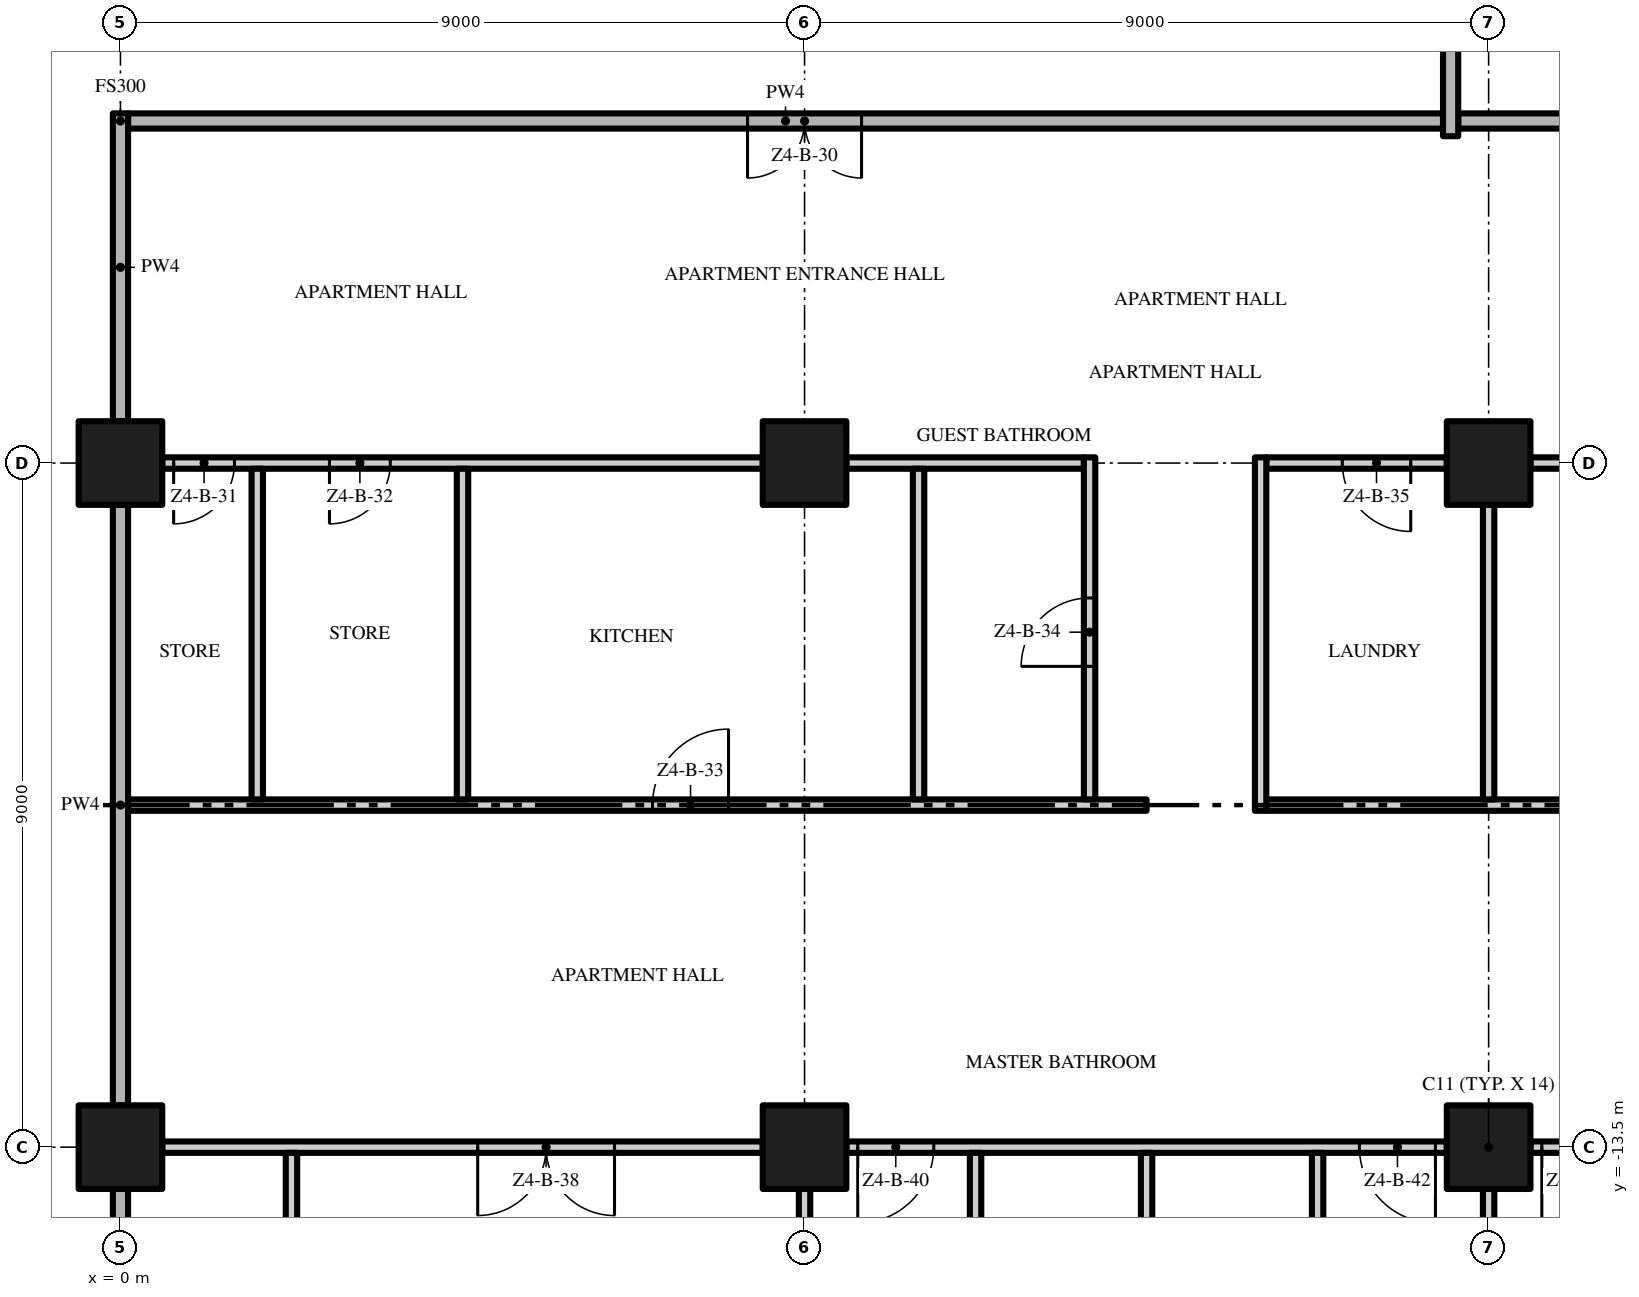
"""IFC4 building model, lengths in metres.
Left out: names, types, materials, properties, quantities, classifications, styles, units other than length and angle.
Written with IfcOpenShell. Run it as: python <this file> out.ifc"""

import sys

from ifc_helpers import new_model, si_unit, direction, frame, frame_2d, origin, origin_2d, place, context, subcontext, project, spatial, rectangle, extrude, element, fill, save


model = new_model("IFC4")
c1 = context("Model", 3, precision=1e-05, world=origin(), true_north=direction((0.0, 1.0)))
c2 = subcontext(c1, "Body", "Model", "MODEL_VIEW")
j1 = project(units=[si_unit("LENGTHUNIT", "METRE"), si_unit("PLANEANGLEUNIT", "RADIAN")], contexts=[c1])
p1 = place(None, origin())
s1 = spatial("IfcSite", under=j1, at=p1, CompositionType="ELEMENT")
p2 = place(p1, origin())
s2 = spatial("IfcBuilding", under=s1, at=p2, CompositionType="ELEMENT")
p3 = place(p2, frame((0.0, 0.0, 199.6)))
s3 = spatial("IfcBuildingStorey", under=s2, at=p3, CompositionType="ELEMENT", Elevation=199.6)
for number, where, z_axis, x_axis in (
    (1, (0.0, -13.5, 0.0), (0.0, 0.0, 1.0), (1.0, 0.0, 0.0)),
    (2, (0.0, -4.5, 0.0), (0.0, 0.0, 1.0), (1.0, 0.0, 0.0)),
    (3, (18.0, -13.5, 0.0), (0.0, 0.0, 1.0), (1.0, 0.0, 0.0)),
    (4, (18.0, -4.5, 0.0), (0.0, 0.0, 1.0), (1.0, 0.0, 0.0)),
    (5, (9.0, -13.5, 0.0), (0.0, 0.0, 1.0), (1.0, 0.0, 0.0)),
    (6, (9.0, -4.5, 0.0), (0.0, 0.0, 1.0), (1.0, 0.0, 0.0)),
):
    element("IfcColumn", number, at=place(p3, frame(where, z_axis=z_axis, x_axis=x_axis)), inside=s3, PredefinedType="COLUMN", context=c2, shape_type="SweptSolid", body=[
        extrude(rectangle(XDim=1.1, YDim=1.1, at=origin_2d()), origin(), (0.0, 0.0, 1.0), 3.5),
    ])
p4 = place(p3, frame((8.45, -13.5, 0.0), z_axis=(0.0, 0.0, 1.0), x_axis=(-1.0, 0.0, 0.0)))
e7 = element("IfcWall", 7, at=p4, inside=s3, PredefinedType="PARTITIONING", context=c2, shape_type="SweptSolid", body=[
    extrude(rectangle(XDim=7.9, YDim=0.15, at=frame_2d((3.95, 0.0))), origin(), (0.0, 0.0, 1.0), 3.5),
])
p5 = place(p4, frame((1.95, 0.0, 0.0)))
e8 = element("IfcOpeningElement", 8, at=p5, cuts=e7, PredefinedType="OPENING", context=c2, shape_type="SweptSolid", body=[
    extrude(rectangle(XDim=1.8, YDim=2.4, at=frame_2d((0.9, 1.2))), frame((0.0, 0.085, 0.0), z_axis=(0.0, -1.0, 0.0), x_axis=(1.0, 0.0, 0.0)), (0.0, 0.0, 1.0), 0.17),
])
p6 = place(p3, frame((17.45, -13.5, 0.0), z_axis=(0.0, 0.0, 1.0), x_axis=(-1.0, 0.0, 0.0)))
e9 = element("IfcWall", 9, at=p6, inside=s3, PredefinedType="PARTITIONING", context=c2, shape_type="SweptSolid", body=[
    extrude(rectangle(XDim=7.9, YDim=0.15, at=frame_2d((3.95, 0.0))), origin(), (0.0, 0.0, 1.0), 3.5),
])
p7 = place(p6, frame((6.75, 0.0, 0.0)))
e10 = element("IfcOpeningElement", 10, at=p7, cuts=e9, PredefinedType="OPENING", context=c2, shape_type="SweptSolid", body=[
    extrude(rectangle(XDim=1.0, YDim=2.4, at=frame_2d((0.5, 1.2))), frame((0.0, 0.085, 0.0), z_axis=(0.0, -1.0, 0.0), x_axis=(1.0, 0.0, 0.0)), (0.0, 0.0, 1.0), 0.17),
])
p8 = place(p6, frame((0.15, 0.0, 0.0)))
e11 = element("IfcOpeningElement", 11, at=p8, cuts=e9, PredefinedType="OPENING", context=c2, shape_type="SweptSolid", body=[
    extrude(rectangle(XDim=1.0, YDim=2.4, at=frame_2d((0.5, 1.2))), frame((0.0, 0.085, 0.0), z_axis=(0.0, -1.0, 0.0), x_axis=(1.0, 0.0, 0.0)), (0.0, 0.0, 1.0), 0.17),
])
p9 = place(p3, frame((26.0, -13.5, 0.0), z_axis=(0.0, 0.0, 1.0), x_axis=(-1.0, 0.0, 0.0)))
e12 = element("IfcWall", 12, at=p9, inside=s3, PredefinedType="PARTITIONING", context=c2, shape_type="SweptSolid", body=[
    extrude(rectangle(XDim=7.45, YDim=0.15, at=frame_2d((3.725, 0.0))), origin(), (0.0, 0.0, 1.0), 3.5),
])
p10 = place(p9, frame((6.3, 0.0, 0.0)))
e13 = element("IfcOpeningElement", 13, at=p10, cuts=e12, PredefinedType="OPENING", context=c2, shape_type="SweptSolid", body=[
    extrude(rectangle(XDim=1.0, YDim=2.4, at=frame_2d((0.5, 1.2))), frame((0.0, 0.085, 0.0), z_axis=(0.0, -1.0, 0.0), x_axis=(1.0, 0.0, 0.0)), (0.0, 0.0, 1.0), 0.17),
])
p11 = place(p9, frame((0.75, 0.0, 0.0)))
e14 = element("IfcOpeningElement", 14, at=p11, cuts=e12, PredefinedType="OPENING", context=c2, shape_type="SweptSolid", body=[
    extrude(rectangle(XDim=1.0, YDim=2.4, at=frame_2d((0.5, 1.2))), frame((0.0, 0.085, 0.0), z_axis=(0.0, -1.0, 0.0), x_axis=(1.0, 0.0, 0.0)), (0.0, 0.0, 1.0), 0.17),
])
p12 = place(p3, frame((0.1, -9.0, 0.0), z_axis=(0.0, 0.0, 1.0), x_axis=(1.0, 0.0, 0.0)))
e15 = element("IfcWall", 15, at=p12, inside=s3, PredefinedType="PARTITIONING", context=c2, shape_type="SweptSolid", body=[
    extrude(rectangle(XDim=13.4, YDim=0.15, at=frame_2d((6.7, 0.0))), origin(), (0.0, 0.0, 1.0), 3.5),
])
p13 = place(p12, frame((6.9, 0.0, 0.0)))
e16 = element("IfcOpeningElement", 16, at=p13, cuts=e15, PredefinedType="OPENING", context=c2, shape_type="SweptSolid", body=[
    extrude(rectangle(XDim=1.0, YDim=2.4, at=frame_2d((0.5, 1.2))), frame((0.0, 0.085, 0.0), z_axis=(0.0, -1.0, 0.0), x_axis=(1.0, 0.0, 0.0)), (0.0, 0.0, 1.0), 0.17),
])
p14 = place(p3, frame((15.075, -9.0, 0.0), z_axis=(0.0, 0.0, 1.0), x_axis=(1.0, 0.0, 0.0)))
e17 = element("IfcWall", 17, at=p14, inside=s3, PredefinedType="PARTITIONING", context=c2, shape_type="SweptSolid", body=[
    extrude(rectangle(XDim=11.625, YDim=0.15, at=frame_2d((5.812, 0.0))), origin(), (0.0, 0.0, 1.0), 3.5),
])
p15 = place(p3, frame((8.45, -4.5, 0.0), z_axis=(0.0, 0.0, 1.0), x_axis=(-1.0, 0.0, 0.0)))
e18 = element("IfcWall", 18, at=p15, inside=s3, PredefinedType="PARTITIONING", context=c2, shape_type="SweptSolid", body=[
    extrude(rectangle(XDim=7.9, YDim=0.15, at=frame_2d((3.95, 0.0))), origin(), (0.0, 0.0, 1.0), 3.5),
])
p16 = place(p15, frame((6.95, 0.0, 0.0)))
e19 = element("IfcOpeningElement", 19, at=p16, cuts=e18, PredefinedType="OPENING", context=c2, shape_type="SweptSolid", body=[
    extrude(rectangle(XDim=0.8, YDim=2.0, at=frame_2d((0.4, 1.0))), frame((0.0, 0.085, 0.0), z_axis=(0.0, -1.0, 0.0), x_axis=(1.0, 0.0, 0.0)), (0.0, 0.0, 1.0), 0.17),
])
p17 = place(p15, frame((4.9, 0.0, 0.0)))
e20 = element("IfcOpeningElement", 20, at=p17, cuts=e18, PredefinedType="OPENING", context=c2, shape_type="SweptSolid", body=[
    extrude(rectangle(XDim=0.8, YDim=2.0, at=frame_2d((0.4, 1.0))), frame((0.0, 0.085, 0.0), z_axis=(0.0, -1.0, 0.0), x_axis=(1.0, 0.0, 0.0)), (0.0, 0.0, 1.0), 0.17),
])
p18 = place(p3, frame((9.55, -4.5, 0.0), z_axis=(0.0, 0.0, 1.0), x_axis=(1.0, 0.0, 0.0)))
e21 = element("IfcWall", 21, at=p18, inside=s3, PredefinedType="PARTITIONING", context=c2, shape_type="SweptSolid", body=[
    extrude(rectangle(XDim=3.125, YDim=0.15, at=frame_2d((1.562, 0.0))), origin(), (0.0, 0.0, 1.0), 3.5),
])
p19 = place(p3, frame((17.45, -4.5, 0.0), z_axis=(0.0, 0.0, 1.0), x_axis=(-1.0, 0.0, 0.0)))
e22 = element("IfcWall", 22, at=p19, inside=s3, PredefinedType="PARTITIONING", context=c2, shape_type="SweptSolid", body=[
    extrude(rectangle(XDim=2.375, YDim=0.15, at=frame_2d((1.188, 0.0))), origin(), (0.0, 0.0, 1.0), 3.5),
])
p20 = place(p19, frame((0.475, 0.0, 0.0)))
e23 = element("IfcOpeningElement", 23, at=p20, cuts=e22, PredefinedType="OPENING", context=c2, shape_type="SweptSolid", body=[
    extrude(rectangle(XDim=0.9, YDim=2.1, at=frame_2d((0.45, 1.05))), frame((0.0, 0.085, 0.0), z_axis=(0.0, -1.0, 0.0), x_axis=(1.0, 0.0, 0.0)), (0.0, 0.0, 1.0), 0.17),
])
p21 = place(p3, frame((26.0, -4.5, 0.0), z_axis=(0.0, 0.0, 1.0), x_axis=(-1.0, 0.0, 0.0)))
e24 = element("IfcWall", 24, at=p21, inside=s3, PredefinedType="PARTITIONING", context=c2, shape_type="SweptSolid", body=[
    extrude(rectangle(XDim=7.45, YDim=0.15, at=frame_2d((3.725, 0.0))), origin(), (0.0, 0.0, 1.0), 3.5),
])
p22 = place(p21, frame((4.95, 0.0, 0.0)))
e25 = element("IfcOpeningElement", 25, at=p22, cuts=e24, PredefinedType="OPENING", context=c2, shape_type="SweptSolid", body=[
    extrude(rectangle(XDim=0.9, YDim=2.1, at=frame_2d((0.45, 1.05))), frame((0.0, 0.085, 0.0), z_axis=(0.0, -1.0, 0.0), x_axis=(1.0, 0.0, 0.0)), (0.0, 0.0, 1.0), 0.17),
])
p23 = place(p3, frame((17.4, 0.0, 0.0), z_axis=(0.0, 0.0, 1.0), x_axis=(-1.0, 0.0, 0.0)))
e26 = element("IfcWall", 26, at=p23, inside=s3, PredefinedType="PARTITIONING", context=c2, shape_type="SweptSolid", body=[
    extrude(rectangle(XDim=17.3, YDim=0.2, at=frame_2d((8.65, 0.0))), origin(), (0.0, 0.0, 1.0), 3.5),
])
p24 = place(p23, frame((7.65, 0.0, 0.0)))
e27 = element("IfcOpeningElement", 27, at=p24, cuts=e26, PredefinedType="OPENING", context=c2, shape_type="SweptSolid", body=[
    extrude(rectangle(XDim=1.5, YDim=2.4, at=frame_2d((0.75, 1.2))), frame((0.0, 0.11, 0.0), z_axis=(0.0, -1.0, 0.0), x_axis=(1.0, 0.0, 0.0)), (0.0, 0.0, 1.0), 0.22),
])
p25 = place(p3, frame((17.6, 0.0, 0.0), z_axis=(0.0, 0.0, 1.0), x_axis=(1.0, 0.0, 0.0)))
e28 = element("IfcWall", 28, at=p25, inside=s3, PredefinedType="PARTITIONING", context=c2, shape_type="SweptSolid", body=[
    extrude(rectangle(XDim=9.1, YDim=0.2, at=frame_2d((4.55, 0.0))), origin(), (0.0, 0.0, 1.0), 3.5),
])
p26 = place(p3, frame((0.0, -21.5, 0.0), z_axis=(0.0, 0.0, 1.0), x_axis=(0.0, 1.0, 0.0)))
e29 = element("IfcWall", 29, at=p26, inside=s3, PredefinedType="PARTITIONING", context=c2, shape_type="SweptSolid", body=[
    extrude(rectangle(XDim=7.45, YDim=0.2, at=frame_2d((3.725, 0.0))), origin(), (0.0, 0.0, 1.0), 3.5),
])
p27 = place(p3, frame((0.0, -12.95, 0.0), z_axis=(0.0, 0.0, 1.0), x_axis=(0.0, 1.0, 0.0)))
e30 = element("IfcWall", 30, at=p27, inside=s3, PredefinedType="PARTITIONING", context=c2, shape_type="SweptSolid", body=[
    extrude(rectangle(XDim=7.9, YDim=0.2, at=frame_2d((3.95, 0.0))), origin(), (0.0, 0.0, 1.0), 3.5),
])
p28 = place(p3, frame((0.0, -3.95, 0.0), z_axis=(0.0, 0.0, 1.0), x_axis=(0.0, 1.0, 0.0)))
e31 = element("IfcWall", 31, at=p28, inside=s3, PredefinedType="PARTITIONING", context=c2, shape_type="SweptSolid", body=[
    extrude(rectangle(XDim=4.05, YDim=0.2, at=frame_2d((2.025, 0.0))), origin(), (0.0, 0.0, 1.0), 3.5),
])
p29 = place(p3, frame((1.8, -8.925, 0.0), z_axis=(0.0, 0.0, 1.0), x_axis=(0.0, 1.0, 0.0)))
e32 = element("IfcWall", 32, at=p29, inside=s3, PredefinedType="PARTITIONING", context=c2, shape_type="SweptSolid", body=[
    extrude(rectangle(XDim=4.35, YDim=0.15, at=frame_2d((2.175, 0.0))), origin(), (0.0, 0.0, 1.0), 3.5),
])
p30 = place(p3, frame((2.25, -16.575, 0.0), z_axis=(0.0, 0.0, 1.0), x_axis=(0.0, 1.0, 0.0)))
e33 = element("IfcWall", 33, at=p30, inside=s3, PredefinedType="PARTITIONING", context=c2, shape_type="SweptSolid", body=[
    extrude(rectangle(XDim=3.0, YDim=0.15, at=frame_2d((1.5, 0.0))), origin(), (0.0, 0.0, 1.0), 3.5),
])
p31 = place(p30, frame((1.125, 0.0, 0.0)))
e34 = element("IfcOpeningElement", 34, at=p31, cuts=e33, PredefinedType="OPENING", context=c2, shape_type="SweptSolid", body=[
    extrude(rectangle(XDim=0.9, YDim=2.1, at=frame_2d((0.45, 1.05))), frame((0.0, 0.085, 0.0), z_axis=(0.0, -1.0, 0.0), x_axis=(1.0, 0.0, 0.0)), (0.0, 0.0, 1.0), 0.17),
])
p32 = place(p3, frame((4.5, -8.925, 0.0), z_axis=(0.0, 0.0, 1.0), x_axis=(0.0, 1.0, 0.0)))
e35 = element("IfcWall", 35, at=p32, inside=s3, PredefinedType="PARTITIONING", context=c2, shape_type="SweptSolid", body=[
    extrude(rectangle(XDim=4.35, YDim=0.15, at=frame_2d((2.175, 0.0))), origin(), (0.0, 0.0, 1.0), 3.5),
])
p33 = place(p3, frame((9.0, -21.5, 0.0), z_axis=(0.0, 0.0, 1.0), x_axis=(0.0, 1.0, 0.0)))
e36 = element("IfcWall", 36, at=p33, inside=s3, PredefinedType="PARTITIONING", context=c2, shape_type="SweptSolid", body=[
    extrude(rectangle(XDim=7.45, YDim=0.15, at=frame_2d((3.725, 0.0))), origin(), (0.0, 0.0, 1.0), 3.5),
])
p34 = place(p3, frame((10.5, -8.925, 0.0), z_axis=(0.0, 0.0, 1.0), x_axis=(0.0, 1.0, 0.0)))
e37 = element("IfcWall", 37, at=p34, inside=s3, PredefinedType="PARTITIONING", context=c2, shape_type="SweptSolid", body=[
    extrude(rectangle(XDim=4.35, YDim=0.15, at=frame_2d((2.175, 0.0))), origin(), (0.0, 0.0, 1.0), 3.5),
])
p35 = place(p3, frame((11.25, -16.575, 0.0), z_axis=(0.0, 0.0, 1.0), x_axis=(0.0, 1.0, 0.0)))
e38 = element("IfcWall", 38, at=p35, inside=s3, PredefinedType="PARTITIONING", context=c2, shape_type="SweptSolid", body=[
    extrude(rectangle(XDim=3.0, YDim=0.15, at=frame_2d((1.5, 0.0))), origin(), (0.0, 0.0, 1.0), 3.5),
])
p36 = place(p3, frame((12.75, -8.925, 0.0), z_axis=(0.0, 0.0, 1.0), x_axis=(0.0, 1.0, 0.0)))
e39 = element("IfcWall", 39, at=p36, inside=s3, PredefinedType="PARTITIONING", context=c2, shape_type="SweptSolid", body=[
    extrude(rectangle(XDim=4.5, YDim=0.15, at=frame_2d((2.25, 0.0))), origin(), (0.0, 0.0, 1.0), 3.5),
])
p37 = place(p36, frame((1.75, 0.0, 0.0)))
e40 = element("IfcOpeningElement", 40, at=p37, cuts=e39, PredefinedType="OPENING", context=c2, shape_type="SweptSolid", body=[
    extrude(rectangle(XDim=0.9, YDim=2.1, at=frame_2d((0.45, 1.05))), frame((0.0, 0.085, 0.0), z_axis=(0.0, -1.0, 0.0), x_axis=(1.0, 0.0, 0.0)), (0.0, 0.0, 1.0), 0.17),
])
p38 = place(p3, frame((13.5, -22.2, 0.0), z_axis=(0.0, 0.0, 1.0), x_axis=(0.0, 1.0, 0.0)))
e41 = element("IfcWall", 41, at=p38, inside=s3, PredefinedType="PARTITIONING", context=c2, shape_type="SweptSolid", body=[
    extrude(rectangle(XDim=8.625, YDim=0.15, at=frame_2d((4.312, 0.0))), origin(), (0.0, 0.0, 1.0), 3.5),
])
p39 = place(p3, frame((15.0, -9.075, 0.0), z_axis=(0.0, 0.0, 1.0), x_axis=(0.0, 1.0, 0.0)))
e42 = element("IfcWall", 42, at=p39, inside=s3, PredefinedType="PARTITIONING", context=c2, shape_type="SweptSolid", body=[
    extrude(rectangle(XDim=4.65, YDim=0.15, at=frame_2d((2.325, 0.0))), origin(), (0.0, 0.0, 1.0), 3.5),
])
p40 = place(p3, frame((15.75, -16.575, 0.0), z_axis=(0.0, 0.0, 1.0), x_axis=(0.0, 1.0, 0.0)))
e43 = element("IfcWall", 43, at=p40, inside=s3, PredefinedType="PARTITIONING", context=c2, shape_type="SweptSolid", body=[
    extrude(rectangle(XDim=3.0, YDim=0.15, at=frame_2d((1.5, 0.0))), origin(), (0.0, 0.0, 1.0), 3.5),
])
p41 = place(p3, frame((17.5, -0.2, 0.0), z_axis=(0.0, 0.0, 1.0), x_axis=(0.0, 1.0, 0.0)))
e44 = element("IfcWall", 44, at=p41, inside=s3, PredefinedType="PARTITIONING", context=c2, shape_type="SweptSolid", body=[
    extrude(rectangle(XDim=4.15, YDim=0.2, at=frame_2d((2.075, 0.0))), origin(), (0.0, 0.0, 1.0), 3.5),
])
p42 = place(p3, frame((18.0, -21.5, 0.0), z_axis=(0.0, 0.0, 1.0), x_axis=(0.0, 1.0, 0.0)))
e45 = element("IfcWall", 45, at=p42, inside=s3, PredefinedType="PARTITIONING", context=c2, shape_type="SweptSolid", body=[
    extrude(rectangle(XDim=7.45, YDim=0.15, at=frame_2d((3.725, 0.0))), origin(), (0.0, 0.0, 1.0), 3.5),
])
p43 = place(p3, frame((18.0, -8.925, 0.0), z_axis=(0.0, 0.0, 1.0), x_axis=(0.0, 1.0, 0.0)))
e46 = element("IfcWall", 46, at=p43, inside=s3, PredefinedType="PARTITIONING", context=c2, shape_type="SweptSolid", body=[
    extrude(rectangle(XDim=3.875, YDim=0.15, at=frame_2d((1.938, 0.0))), origin(), (0.0, 0.0, 1.0), 3.5),
])
p44 = place(p24, origin())
e47 = element("IfcDoor", 47, at=p44, inside=s3, OperationType="DOUBLE_DOOR_SINGLE_SWING", PredefinedType="DOOR", context=c2, shape_type="SweptSolid", body=[
    extrude(rectangle(XDim=1.5, YDim=2.4, at=frame_2d((0.75, 1.2))), frame((0.0, 0.025, 0.0), z_axis=(0.0, -1.0, 0.0), x_axis=(1.0, 0.0, 0.0)), (0.0, 0.0, 1.0), 0.05),
])
fill(e27, e47)
p45 = place(p16, origin())
e48 = element("IfcDoor", 48, at=p45, inside=s3, OperationType="SINGLE_SWING_RIGHT", PredefinedType="DOOR", context=c2, shape_type="SweptSolid", body=[
    extrude(rectangle(XDim=0.8, YDim=2.0, at=frame_2d((0.4, 1.0))), frame((0.0, 0.025, 0.0), z_axis=(0.0, -1.0, 0.0), x_axis=(1.0, 0.0, 0.0)), (0.0, 0.0, 1.0), 0.05),
])
fill(e19, e48)
p46 = place(p17, origin())
e49 = element("IfcDoor", 49, at=p46, inside=s3, OperationType="SINGLE_SWING_RIGHT", PredefinedType="DOOR", context=c2, shape_type="SweptSolid", body=[
    extrude(rectangle(XDim=0.8, YDim=2.0, at=frame_2d((0.4, 1.0))), frame((0.0, 0.025, 0.0), z_axis=(0.0, -1.0, 0.0), x_axis=(1.0, 0.0, 0.0)), (0.0, 0.0, 1.0), 0.05),
])
fill(e20, e49)
p47 = place(p13, origin())
e50 = element("IfcDoor", 50, at=p47, inside=s3, OperationType="SINGLE_SWING_RIGHT", PredefinedType="DOOR", context=c2, shape_type="SweptSolid", body=[
    extrude(rectangle(XDim=1.0, YDim=2.4, at=frame_2d((0.5, 1.2))), frame((0.0, 0.025, 0.0), z_axis=(0.0, -1.0, 0.0), x_axis=(1.0, 0.0, 0.0)), (0.0, 0.0, 1.0), 0.05),
])
fill(e16, e50)
p48 = place(p37, origin())
e51 = element("IfcDoor", 51, at=p48, inside=s3, OperationType="SINGLE_SWING_LEFT", PredefinedType="DOOR", context=c2, shape_type="SweptSolid", body=[
    extrude(rectangle(XDim=0.9, YDim=2.1, at=frame_2d((0.45, 1.05))), frame((0.0, 0.025, 0.0), z_axis=(0.0, -1.0, 0.0), x_axis=(1.0, 0.0, 0.0)), (0.0, 0.0, 1.0), 0.05),
])
fill(e40, e51)
p49 = place(p20, origin())
e52 = element("IfcDoor", 52, at=p49, inside=s3, OperationType="SINGLE_SWING_LEFT", PredefinedType="DOOR", context=c2, shape_type="SweptSolid", body=[
    extrude(rectangle(XDim=0.9, YDim=2.1, at=frame_2d((0.45, 1.05))), frame((0.0, 0.025, 0.0), z_axis=(0.0, -1.0, 0.0), x_axis=(1.0, 0.0, 0.0)), (0.0, 0.0, 1.0), 0.05),
])
fill(e23, e52)
p50 = place(p5, origin())
e53 = element("IfcDoor", 53, at=p50, inside=s3, OperationType="DOUBLE_DOOR_SINGLE_SWING", PredefinedType="DOOR", context=c2, shape_type="SweptSolid", body=[
    extrude(rectangle(XDim=1.8, YDim=2.4, at=frame_2d((0.9, 1.2))), frame((0.0, 0.025, 0.0), z_axis=(0.0, -1.0, 0.0), x_axis=(1.0, 0.0, 0.0)), (0.0, 0.0, 1.0), 0.05),
])
fill(e8, e53)
p51 = place(p7, origin())
e54 = element("IfcDoor", 54, at=p51, inside=s3, OperationType="SINGLE_SWING_RIGHT", PredefinedType="DOOR", context=c2, shape_type="SweptSolid", body=[
    extrude(rectangle(XDim=1.0, YDim=2.4, at=frame_2d((0.5, 1.2))), frame((0.0, 0.025, 0.0), z_axis=(0.0, -1.0, 0.0), x_axis=(1.0, 0.0, 0.0)), (0.0, 0.0, 1.0), 0.05),
])
fill(e10, e54)
p52 = place(p8, origin())
e55 = element("IfcDoor", 55, at=p52, inside=s3, OperationType="SINGLE_SWING_LEFT", PredefinedType="DOOR", context=c2, shape_type="SweptSolid", body=[
    extrude(rectangle(XDim=1.0, YDim=2.4, at=frame_2d((0.5, 1.2))), frame((0.0, 0.025, 0.0), z_axis=(0.0, -1.0, 0.0), x_axis=(1.0, 0.0, 0.0)), (0.0, 0.0, 1.0), 0.05),
])
fill(e11, e55)
p53 = place(p10, origin())
e56 = element("IfcDoor", 56, at=p53, inside=s3, OperationType="SINGLE_SWING_RIGHT", PredefinedType="DOOR", context=c2, shape_type="SweptSolid", body=[
    extrude(rectangle(XDim=1.0, YDim=2.4, at=frame_2d((0.5, 1.2))), frame((0.0, 0.025, 0.0), z_axis=(0.0, -1.0, 0.0), x_axis=(1.0, 0.0, 0.0)), (0.0, 0.0, 1.0), 0.05),
])
fill(e13, e56)
save(model, sys.argv[1])
